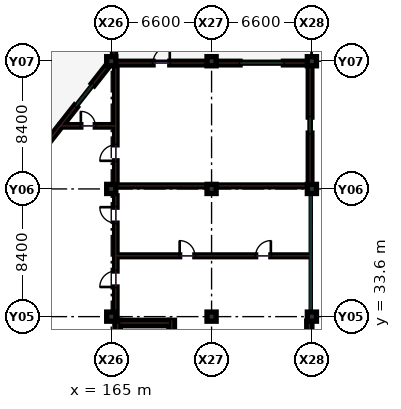
"""IFC4 building model, lengths in metres.
Left out: names, types, materials, properties, quantities, classifications, styles, units other than length and angle.
Written with IfcOpenShell. Run it as: python <this file> out.ifc"""

import sys

from ifc_helpers import new_model, si_unit, direction, frame, frame_2d, origin, origin_2d, place, context, subcontext, project, spatial, rectangle, extrude, element, fill, save


model = new_model("IFC4")
c1 = context("Model", 3, precision=1e-05, world=origin(), true_north=direction((0.0, 1.0)))
c2 = subcontext(c1, "Body", "Model", "MODEL_VIEW")
j1 = project(units=[si_unit("LENGTHUNIT", "METRE"), si_unit("PLANEANGLEUNIT", "RADIAN")], contexts=[c1])
p1 = place(None, origin())
s1 = spatial("IfcSite", under=j1, at=p1, CompositionType="ELEMENT")
p2 = place(p1, origin())
s2 = spatial("IfcBuilding", under=s1, at=p2, CompositionType="ELEMENT")
p3 = place(p2, frame((0.0, 0.0, 31.2)))
s3 = spatial("IfcBuildingStorey", under=s2, at=p3, CompositionType="ELEMENT", Elevation=31.2)
for number, where, z_axis, x_axis in (
    (1, (165.0, 33.6, 0.0), (0.0, 0.0, 1.0), (1.0, 0.0, 0.0)),
    (2, (165.0, 42.0, 0.0), (0.0, 0.0, 1.0), (1.0, 0.0, 0.0)),
    (3, (165.0, 50.4, 0.0), (0.0, 0.0, 1.0), (1.0, 0.0, 0.0)),
    (4, (171.6, 33.6, 0.0), (0.0, 0.0, 1.0), (1.0, 0.0, 0.0)),
    (5, (171.6, 42.0, 0.0), (0.0, 0.0, 1.0), (1.0, 0.0, 0.0)),
    (6, (171.6, 50.4, 0.0), (0.0, 0.0, 1.0), (1.0, 0.0, 0.0)),
    (7, (178.2, 33.6, 0.0), (0.0, 0.0, 1.0), (1.0, 0.0, 0.0)),
    (8, (178.2, 42.0, 0.0), (0.0, 0.0, 1.0), (1.0, 0.0, 0.0)),
    (9, (178.2, 50.4, 0.0), (0.0, 0.0, 1.0), (1.0, 0.0, 0.0)),
):
    element("IfcColumn", number, at=place(p3, frame(where, z_axis=z_axis, x_axis=x_axis)), inside=s3, PredefinedType="COLUMN", context=c2, shape_type="SweptSolid", body=[
        extrude(rectangle(XDim=0.6, YDim=0.6, at=origin_2d()), origin(), (0.0, 0.0, 1.0), 4.2),
    ])
p4 = place(p3, frame((165.3, 33.65, 0.0), z_axis=(0.0, 0.0, 1.0), x_axis=(0.0, 1.0, 0.0)))
e10 = element("IfcWall", 10, at=p4, inside=s3, PredefinedType="PARTITIONING", context=c2, shape_type="SweptSolid", body=[
    extrude(rectangle(XDim=7.9, YDim=0.16, at=frame_2d((3.95, 0.0))), origin(), (0.0, 0.0, 1.0), 3.23),
])
p5 = place(p4, frame((1.9, 0.0, 0.0)))
e11 = element("IfcOpeningElement", 11, at=p5, cuts=e10, PredefinedType="OPENING", context=c2, shape_type="SweptSolid", body=[
    extrude(rectangle(XDim=1.05, YDim=2.15, at=frame_2d((0.525, 1.075))), frame((0.0, 0.09, 0.0), z_axis=(0.0, -1.0, 0.0), x_axis=(1.0, 0.0, 0.0)), (0.0, 0.0, 1.0), 0.18),
])
p6 = place(p4, frame((6.1, 0.0, 0.0)))
e12 = element("IfcOpeningElement", 12, at=p6, cuts=e10, PredefinedType="OPENING", context=c2, shape_type="SweptSolid", body=[
    extrude(rectangle(XDim=1.05, YDim=2.15, at=frame_2d((0.525, 1.075))), frame((0.0, 0.09, 0.0), z_axis=(0.0, -1.0, 0.0), x_axis=(1.0, 0.0, 0.0)), (0.0, 0.0, 1.0), 0.18),
])
p7 = place(p3, frame((165.3, 42.45, 0.0), z_axis=(0.0, 0.0, 1.0), x_axis=(0.0, 1.0, 0.0)))
e13 = element("IfcWall", 13, at=p7, inside=s3, PredefinedType="PARTITIONING", context=c2, shape_type="SweptSolid", body=[
    extrude(rectangle(XDim=7.7, YDim=0.16, at=frame_2d((3.85, 0.0))), origin(), (0.0, 0.0, 1.0), 3.23),
])
p8 = place(p7, frame((1.4, 0.0, 0.0)))
e14 = element("IfcOpeningElement", 14, at=p8, cuts=e13, PredefinedType="OPENING", context=c2, shape_type="SweptSolid", body=[
    extrude(rectangle(XDim=1.05, YDim=2.15, at=frame_2d((0.525, 1.075))), frame((0.0, 0.09, 0.0), z_axis=(0.0, -1.0, 0.0), x_axis=(1.0, 0.0, 0.0)), (0.0, 0.0, 1.0), 0.18),
])
p9 = place(p3, frame((165.3, 42.2, 0.0), z_axis=(0.0, 0.0, 1.0), x_axis=(1.0, 0.0, 0.0)))
e15 = element("IfcWall", 15, at=p9, inside=s3, PredefinedType="PARTITIONING", context=c2, shape_type="SweptSolid", body=[
    extrude(rectangle(XDim=5.85, YDim=0.12, at=frame_2d((2.925, 0.0))), origin(), (0.0, 0.0, 1.0), 3.23),
])
p10 = place(p3, frame((172.05, 42.2, 0.0), z_axis=(0.0, 0.0, 1.0), x_axis=(1.0, 0.0, 0.0)))
e16 = element("IfcWall", 16, at=p10, inside=s3, PredefinedType="PARTITIONING", context=c2, shape_type="SweptSolid", body=[
    extrude(rectangle(XDim=5.95, YDim=0.12, at=frame_2d((2.975, 0.0))), origin(), (0.0, 0.0, 1.0), 3.23),
])
p11 = place(p3, frame((165.3, 37.6, 0.0), z_axis=(0.0, 0.0, 1.0), x_axis=(1.0, 0.0, 0.0)))
e17 = element("IfcWall", 17, at=p11, inside=s3, PredefinedType="PARTITIONING", context=c2, shape_type="SweptSolid", body=[
    extrude(rectangle(XDim=12.75, YDim=0.12, at=frame_2d((6.375, 0.0))), origin(), (0.0, 0.0, 1.0), 3.23),
])
p12 = place(p11, frame((4.2, 0.0, 0.0)))
e18 = element("IfcOpeningElement", 18, at=p12, cuts=e17, PredefinedType="OPENING", context=c2, shape_type="SweptSolid", body=[
    extrude(rectangle(XDim=1.0, YDim=2.2, at=frame_2d((0.5, 1.1))), frame((0.0, 0.07, 0.0), z_axis=(0.0, -1.0, 0.0), x_axis=(1.0, 0.0, 0.0)), (0.0, 0.0, 1.0), 0.14),
])
p13 = place(p11, frame((9.2, 0.0, 0.0)))
e19 = element("IfcOpeningElement", 19, at=p13, cuts=e17, PredefinedType="OPENING", context=c2, shape_type="SweptSolid", body=[
    extrude(rectangle(XDim=1.0, YDim=2.2, at=frame_2d((0.5, 1.1))), frame((0.0, 0.07, 0.0), z_axis=(0.0, -1.0, 0.0), x_axis=(1.0, 0.0, 0.0)), (0.0, 0.0, 1.0), 0.14),
])
p14 = place(p3, frame((161.65, 46.15, 0.0), z_axis=(0.0, 0.0, 1.0), x_axis=(1.0, 0.0, 0.0)))
e20 = element("IfcWall", 20, at=p14, inside=s3, PredefinedType="PARTITIONING", context=c2, shape_type="SweptSolid", body=[
    extrude(rectangle(XDim=3.65, YDim=0.16, at=frame_2d((1.825, 0.0))), origin(), (0.0, 0.0, 1.0), 3.23),
])
p15 = place(p14, frame((1.35, 0.0, 0.0)))
e21 = element("IfcOpeningElement", 21, at=p15, cuts=e20, PredefinedType="OPENING", context=c2, shape_type="SweptSolid", body=[
    extrude(rectangle(XDim=0.95, YDim=2.15, at=frame_2d((0.475, 1.075))), frame((0.0, 0.09, 0.0), z_axis=(0.0, -1.0, 0.0), x_axis=(1.0, 0.0, 0.0)), (0.0, 0.0, 1.0), 0.18),
])
p16 = place(p3, frame((171.305, 50.28, 0.0), z_axis=(0.0, 0.0, 1.0), x_axis=(-1.0, 0.0, 0.0)))
e22 = element("IfcWall", 22, at=p16, inside=s3, PredefinedType="SOLIDWALL", context=c2, shape_type="SweptSolid", body=[
    extrude(rectangle(XDim=6.01, YDim=0.24, at=frame_2d((3.005, 0.0))), origin(), (0.0, 0.0, 1.0), 3.315),
])
p17 = place(p16, frame((2.455, 0.0, 0.0)))
e23 = element("IfcOpeningElement", 23, at=p17, cuts=e22, PredefinedType="OPENING", context=c2, shape_type="SweptSolid", body=[
    extrude(rectangle(XDim=1.1, YDim=2.2, at=frame_2d((0.55, 1.1))), frame((0.0, 0.13, 0.0), z_axis=(0.0, -1.0, 0.0), x_axis=(1.0, 0.0, 0.0)), (0.0, 0.0, 1.0), 0.26),
])
p18 = place(p3, frame((178.03, 25.495, 0.0), z_axis=(0.0, 0.0, 1.0), x_axis=(0.0, 1.0, 0.0)))
e24 = element("IfcWall", 24, at=p18, inside=s3, PredefinedType="SHEAR", context=c2, shape_type="SweptSolid", body=[
    extrude(rectangle(XDim=7.81, YDim=0.34, at=frame_2d((3.905, 0.0))), origin(), (0.0, 0.0, 1.0), 3.98),
])
p19 = place(p3, frame((178.08, 42.295, 0.0), z_axis=(0.0, 0.0, 1.0), x_axis=(0.0, 1.0, 0.0)))
e25 = element("IfcWall", 25, at=p19, inside=s3, PredefinedType="SOLIDWALL", context=c2, shape_type="SweptSolid", body=[
    extrude(rectangle(XDim=7.81, YDim=0.24, at=frame_2d((3.905, 0.0))), origin(), (0.0, 0.0, 1.0), 3.415),
])
p20 = place(p19, frame((3.38, 0.0, 0.95)))
e26 = element("IfcOpeningElement", 26, at=p20, cuts=e25, PredefinedType="OPENING", context=c2, shape_type="SweptSolid", body=[
    extrude(rectangle(XDim=1.05, YDim=1.75, at=frame_2d((0.525, 0.875))), frame((0.0, 0.13, 0.0), z_axis=(0.0, -1.0, 0.0), x_axis=(1.0, 0.0, 0.0)), (0.0, 0.0, 1.0), 0.26),
])
p21 = place(p3, frame((177.905, 50.28, 0.0), z_axis=(0.0, 0.0, 1.0), x_axis=(-1.0, 0.0, 0.0)))
e27 = element("IfcWall", 27, at=p21, inside=s3, PredefinedType="SOLIDWALL", context=c2, shape_type="SweptSolid", body=[
    extrude(rectangle(XDim=6.01, YDim=0.24, at=frame_2d((3.005, 0.0))), origin(), (0.0, 0.0, 1.0), 3.315),
])
p22 = place(p21, frame((1.58, 0.0, 0.95)))
e28 = element("IfcOpeningElement", 28, at=p22, cuts=e27, PredefinedType="OPENING", context=c2, shape_type="SweptSolid", body=[
    extrude(rectangle(XDim=2.85, YDim=1.65, at=frame_2d((1.425, 0.825))), frame((0.0, 0.13, 0.0), z_axis=(0.0, -1.0, 0.0), x_axis=(1.0, 0.0, 0.0)), (0.0, 0.0, 1.0), 0.26),
])
p23 = place(p3, frame((158.62, 42.28, 0.0), z_axis=(0.0, 0.0, 1.0), x_axis=(0.617811819191, 0.786325985878, 0.0)))
e29 = element("IfcWall", 29, at=p23, inside=s3, PredefinedType="SOLIDWALL", context=c2, shape_type="SweptSolid", body=[
    extrude(rectangle(XDim=9.97, YDim=0.24, at=frame_2d((4.985, 0.0))), origin(), (0.0, 0.0, 1.0), 3.365),
])
p24 = place(p23, frame((1.6, 0.0, 0.95)))
e30 = element("IfcOpeningElement", 30, at=p24, cuts=e29, PredefinedType="OPENING", context=c2, shape_type="SweptSolid", body=[
    extrude(rectangle(XDim=1.8, YDim=1.6, at=frame_2d((0.9, 0.8))), frame((0.0, 0.13, 0.0), z_axis=(0.0, -1.0, 0.0), x_axis=(1.0, 0.0, 0.0)), (0.0, 0.0, 1.0), 0.26),
])
p25 = place(p23, frame((6.57, 0.0, 0.95)))
e31 = element("IfcOpeningElement", 31, at=p25, cuts=e29, PredefinedType="OPENING", context=c2, shape_type="SweptSolid", body=[
    extrude(rectangle(XDim=1.8, YDim=1.6, at=frame_2d((0.9, 0.8))), frame((0.0, 0.13, 0.0), z_axis=(0.0, -1.0, 0.0), x_axis=(1.0, 0.0, 0.0)), (0.0, 0.0, 1.0), 0.26),
])
p26 = place(p3, frame((151.95, 50.45, 0.0), z_axis=(0.0, 0.0, 1.0), x_axis=(0.84486875059, 0.534973638861, 0.0)))
e32 = element("IfcWall", 32, at=p26, inside=s3, PredefinedType="PARAPET", context=c2, shape_type="SweptSolid", body=[
    extrude(rectangle(XDim=15.328, YDim=0.2, at=frame_2d((7.664, 0.0))), origin(), (0.0, 0.0, 1.0), 1.1),
])
p27 = place(p3, frame((165.18, 50.45, 0.0), z_axis=(0.0, 0.0, 1.0), x_axis=(0.0, 1.0, 0.0)))
e33 = element("IfcWall", 33, at=p27, inside=s3, PredefinedType="PARAPET", context=c2, shape_type="SweptSolid", body=[
    extrude(rectangle(XDim=8.3, YDim=0.2, at=frame_2d((4.15, 0.0))), origin(), (0.0, 0.0, 1.0), 1.1),
])
p28 = place(p3, frame((165.42, 25.19, 0.0), z_axis=(0.0, 0.0, 1.0), x_axis=(0.0, 1.0, 0.0)))
e34 = element("IfcWall", 34, at=p28, inside=s3, PredefinedType="SHEAR", context=c2, shape_type="SweptSolid", body=[
    extrude(rectangle(XDim=8.17, YDim=0.36, at=frame_2d((4.085, 0.0))), origin(), (0.0, 0.0, 1.0), 3.98),
])
p29 = place(p3, frame((168.98, 25.19, 0.0), z_axis=(0.0, 0.0, 1.0), x_axis=(0.0, 1.0, 0.0)))
e35 = element("IfcWall", 35, at=p29, inside=s3, PredefinedType="SHEAR", context=c2, shape_type="SweptSolid", body=[
    extrude(rectangle(XDim=8.17, YDim=0.36, at=frame_2d((4.085, 0.0))), origin(), (0.0, 0.0, 1.0), 3.98),
])
p30 = place(p29, frame((0.45, 0.0, 0.0)))
e36 = element("IfcOpeningElement", 36, at=p30, cuts=e35, PredefinedType="OPENING", context=c2, shape_type="SweptSolid", body=[
    extrude(rectangle(XDim=1.25, YDim=2.15, at=frame_2d((0.625, 1.075))), frame((0.0, 0.19, 0.0), z_axis=(0.0, -1.0, 0.0), x_axis=(1.0, 0.0, 0.0)), (0.0, 0.0, 1.0), 0.38),
])
p31 = place(p3, frame((165.6, 33.18, 0.0), z_axis=(0.0, 0.0, 1.0), x_axis=(1.0, 0.0, 0.0)))
e37 = element("IfcWall", 37, at=p31, inside=s3, PredefinedType="SHEAR", context=c2, shape_type="SweptSolid", body=[
    extrude(rectangle(XDim=3.2, YDim=0.36, at=frame_2d((1.6, 0.0))), origin(), (0.0, 0.0, 1.0), 3.98),
])
p32 = place(p5, origin())
e38 = element("IfcDoor", 38, at=p32, inside=s3, OperationType="SINGLE_SWING_LEFT", PredefinedType="DOOR", context=c2, shape_type="SweptSolid", body=[
    extrude(rectangle(XDim=1.05, YDim=2.15, at=frame_2d((0.525, 1.075))), frame((0.0, 0.025, 0.0), z_axis=(0.0, -1.0, 0.0), x_axis=(1.0, 0.0, 0.0)), (0.0, 0.0, 1.0), 0.05),
])
fill(e11, e38)
p33 = place(p6, origin())
e39 = element("IfcDoor", 39, at=p33, inside=s3, OperationType="SINGLE_SWING_RIGHT", PredefinedType="DOOR", context=c2, shape_type="SweptSolid", body=[
    extrude(rectangle(XDim=1.05, YDim=2.15, at=frame_2d((0.525, 1.075))), frame((0.0, 0.025, 0.0), z_axis=(0.0, -1.0, 0.0), x_axis=(1.0, 0.0, 0.0)), (0.0, 0.0, 1.0), 0.05),
])
fill(e12, e39)
p34 = place(p8, origin())
e40 = element("IfcDoor", 40, at=p34, inside=s3, OperationType="SINGLE_SWING_LEFT", PredefinedType="DOOR", context=c2, shape_type="SweptSolid", body=[
    extrude(rectangle(XDim=1.05, YDim=2.15, at=frame_2d((0.525, 1.075))), frame((0.0, 0.025, 0.0), z_axis=(0.0, -1.0, 0.0), x_axis=(1.0, 0.0, 0.0)), (0.0, 0.0, 1.0), 0.05),
])
fill(e14, e40)
p35 = place(p12, origin())
e41 = element("IfcDoor", 41, at=p35, inside=s3, OperationType="SINGLE_SWING_LEFT", PredefinedType="DOOR", context=c2, shape_type="SweptSolid", body=[
    extrude(rectangle(XDim=1.0, YDim=2.2, at=frame_2d((0.5, 1.1))), frame((0.0, 0.025, 0.0), z_axis=(0.0, -1.0, 0.0), x_axis=(1.0, 0.0, 0.0)), (0.0, 0.0, 1.0), 0.05),
])
fill(e18, e41)
p36 = place(p13, origin())
e42 = element("IfcDoor", 42, at=p36, inside=s3, OperationType="SINGLE_SWING_RIGHT", PredefinedType="DOOR", context=c2, shape_type="SweptSolid", body=[
    extrude(rectangle(XDim=1.0, YDim=2.2, at=frame_2d((0.5, 1.1))), frame((0.0, 0.025, 0.0), z_axis=(0.0, -1.0, 0.0), x_axis=(1.0, 0.0, 0.0)), (0.0, 0.0, 1.0), 0.05),
])
fill(e19, e42)
p37 = place(p15, origin())
e43 = element("IfcDoor", 43, at=p37, inside=s3, OperationType="SINGLE_SWING_LEFT", PredefinedType="DOOR", context=c2, shape_type="SweptSolid", body=[
    extrude(rectangle(XDim=0.95, YDim=2.15, at=frame_2d((0.475, 1.075))), frame((0.0, 0.025, 0.0), z_axis=(0.0, -1.0, 0.0), x_axis=(1.0, 0.0, 0.0)), (0.0, 0.0, 1.0), 0.05),
])
fill(e21, e43)
p38 = place(p17, frame((1.1, 0.0, 0.0), z_axis=(0.0, 0.0, 1.0), x_axis=(-1.0, 0.0, 0.0)))
e44 = element("IfcDoor", 44, at=p38, inside=s3, OperationType="SINGLE_SWING_LEFT", PredefinedType="DOOR", context=c2, shape_type="SweptSolid", body=[
    extrude(rectangle(XDim=1.1, YDim=2.2, at=frame_2d((0.55, 1.1))), frame((0.0, 0.025, 0.0), z_axis=(0.0, -1.0, 0.0), x_axis=(1.0, 0.0, 0.0)), (0.0, 0.0, 1.0), 0.05),
])
fill(e23, e44)
p39 = place(p20, origin())
e45 = element("IfcWindow", 45, at=p39, inside=s3, PartitioningType="SINGLE_PANEL", PredefinedType="WINDOW", context=c2, shape_type="SweptSolid", body=[
    extrude(rectangle(XDim=1.05, YDim=1.75, at=frame_2d((0.525, 0.875))), frame((0.0, 0.03, 0.0), z_axis=(0.0, -1.0, 0.0), x_axis=(1.0, 0.0, 0.0)), (0.0, 0.0, 1.0), 0.06),
])
fill(e26, e45)
p40 = place(p22, origin())
e46 = element("IfcWindow", 46, at=p40, inside=s3, PartitioningType="SINGLE_PANEL", PredefinedType="WINDOW", context=c2, shape_type="SweptSolid", body=[
    extrude(rectangle(XDim=2.85, YDim=1.65, at=frame_2d((1.425, 0.825))), frame((0.0, 0.03, 0.0), z_axis=(0.0, -1.0, 0.0), x_axis=(1.0, 0.0, 0.0)), (0.0, 0.0, 1.0), 0.06),
])
fill(e28, e46)
p41 = place(p25, origin())
e47 = element("IfcWindow", 47, at=p41, inside=s3, PartitioningType="SINGLE_PANEL", PredefinedType="WINDOW", context=c2, shape_type="SweptSolid", body=[
    extrude(rectangle(XDim=1.8, YDim=1.6, at=frame_2d((0.9, 0.8))), frame((0.0, 0.03, 0.0), z_axis=(0.0, -1.0, 0.0), x_axis=(1.0, 0.0, 0.0)), (0.0, 0.0, 1.0), 0.06),
])
fill(e31, e47)
save(model, sys.argv[1])
